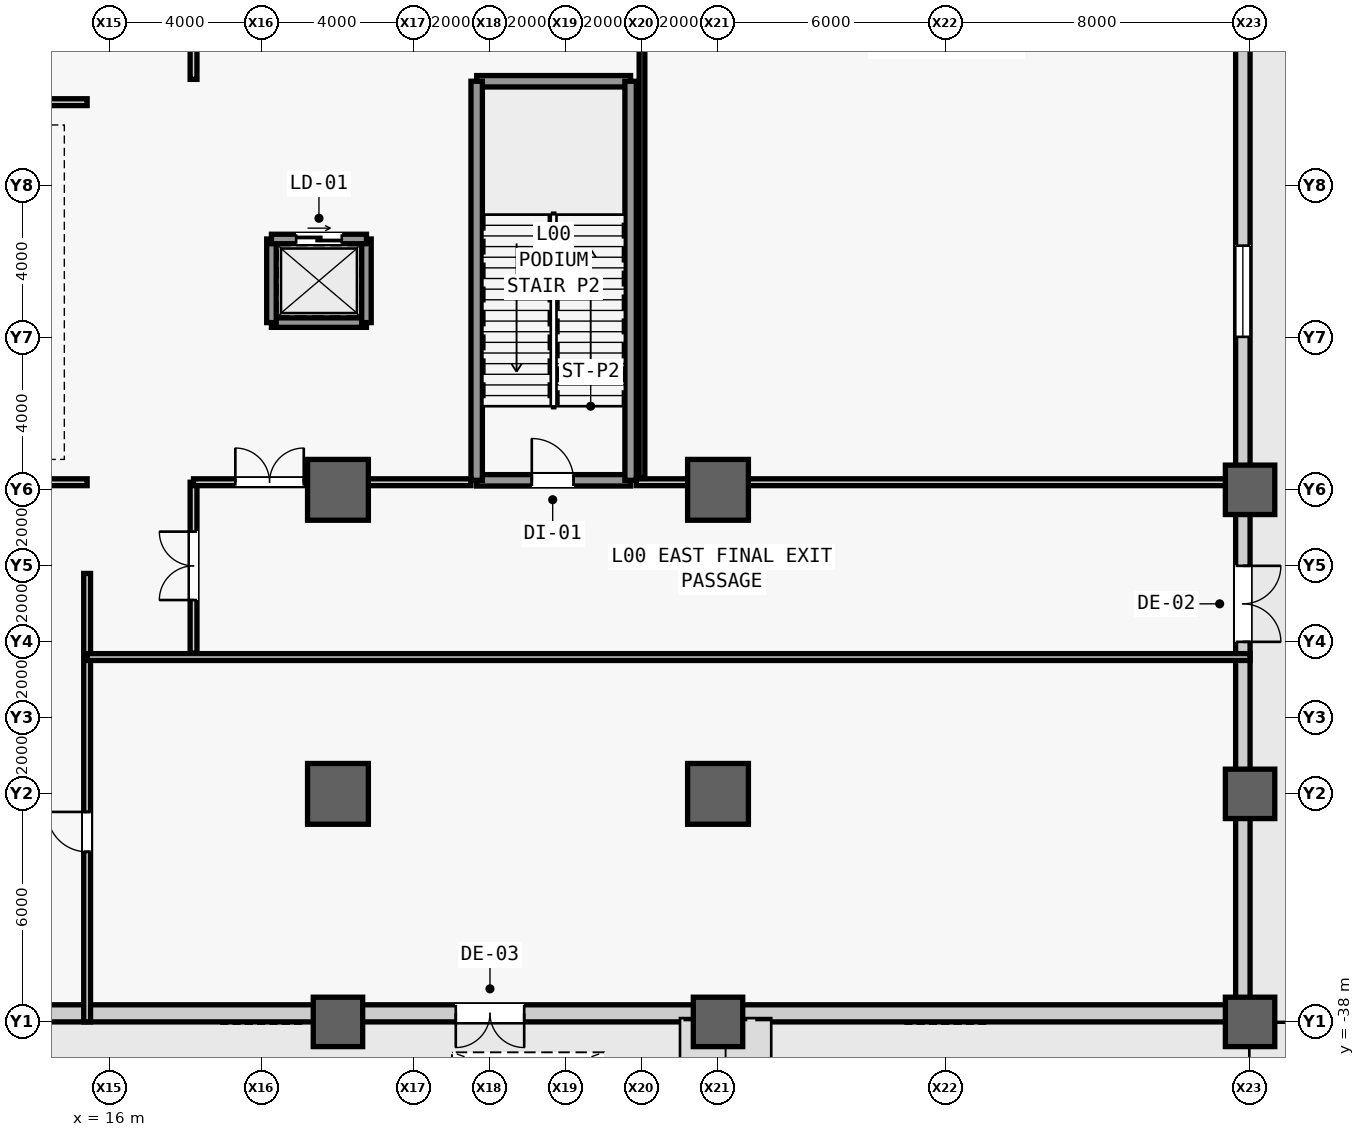
"""IFC4 building model, lengths in metres.
Left out: names, types, materials, properties, quantities, classifications, styles, units other than length and angle.
Written with IfcOpenShell. Run it as: python <this file> out.ifc"""

import sys

from ifc_helpers import new_model, si_unit, direction, frame, frame_2d, origin, origin_2d, place, context, subcontext, project, spatial, rectangle, extrude, source, transform, mapped, element, fill, save


model = new_model("IFC4")
c1 = context("Model", 3, precision=1e-05, world=origin(), true_north=direction((0.0, 1.0)))
c2 = subcontext(c1, "Body", "Model", "MODEL_VIEW")
j1 = project(units=[si_unit("LENGTHUNIT", "METRE"), si_unit("PLANEANGLEUNIT", "RADIAN")], contexts=[c1])
p1 = place(None, origin())
s1 = spatial("IfcSite", under=j1, at=p1, CompositionType="ELEMENT")
p2 = place(p1, origin())
s2 = spatial("IfcBuilding", under=s1, at=p2, CompositionType="ELEMENT")
p3 = place(p2, origin())
s3 = spatial("IfcBuildingStorey", under=s2, at=p3, CompositionType="ELEMENT", Elevation=0.0)
m1 = source(origin(), c2, "Body", "SweptSolid", [
    extrude(rectangle(XDim=1.3, YDim=1.3, at=origin_2d()), origin(), (0.0, 0.0, 1.0), 6.6),
])
p4 = place(p3, frame((22.0, -38.0, 0.0), z_axis=(0.0, 0.0, 1.0), x_axis=(1.0, 0.0, 0.0)))
e1 = element("IfcColumn", 1, at=p4, inside=s3, PredefinedType="COLUMN", context=c2, shape_type="MappedRepresentation", body=[
    mapped(m1, transform((0.0, 0.0, 0.0), scale=1.0)),
])
m2 = source(origin(), c2, "Body", "SweptSolid", [
    extrude(rectangle(XDim=1.6, YDim=1.6, at=origin_2d()), origin(), (0.0, 0.0, 1.0), 6.6),
])
for number, where, z_axis, x_axis in (
    (2, (22.0, -32.0, 0.0), (0.0, 0.0, 1.0), (1.0, 0.0, 0.0)),
    (3, (22.0, -24.0, 0.0), (0.0, 0.0, 1.0), (1.0, 0.0, 0.0)),
):
    element("IfcColumn", number, at=place(p3, frame(where, z_axis=z_axis, x_axis=x_axis)), inside=s3, PredefinedType="COLUMN", context=c2, shape_type="MappedRepresentation", body=[
        mapped(m2, transform((0.0, 0.0, 0.0), scale=1.0)),
    ])
p5 = place(p3, frame((32.0, -38.0, 0.0), z_axis=(0.0, 0.0, 1.0), x_axis=(1.0, 0.0, 0.0)))
e4 = element("IfcColumn", 4, at=p5, inside=s3, PredefinedType="COLUMN", context=c2, shape_type="MappedRepresentation", body=[
    mapped(m1, transform((0.0, 0.0, 0.0), scale=1.0)),
])
for number, where, z_axis, x_axis in (
    (5, (32.0, -32.0, 0.0), (0.0, 0.0, 1.0), (1.0, 0.0, 0.0)),
    (6, (32.0, -24.0, 0.0), (0.0, 0.0, 1.0), (1.0, 0.0, 0.0)),
):
    element("IfcColumn", number, at=place(p3, frame(where, z_axis=z_axis, x_axis=x_axis)), inside=s3, PredefinedType="COLUMN", context=c2, shape_type="MappedRepresentation", body=[
        mapped(m2, transform((0.0, 0.0, 0.0), scale=1.0)),
    ])
for number, where, z_axis, x_axis in (
    (7, (46.0, -38.0, 0.0), (0.0, 0.0, 1.0), (1.0, 0.0, 0.0)),
    (8, (46.0, -24.0, 0.0), (0.0, 0.0, 1.0), (1.0, 0.0, 0.0)),
    (9, (46.0, -32.0, 0.0), (0.0, 0.0, 1.0), (1.0, 0.0, 0.0)),
):
    element("IfcColumn", number, at=place(p3, frame(where, z_axis=z_axis, x_axis=x_axis)), inside=s3, PredefinedType="COLUMN", context=c2, shape_type="MappedRepresentation", body=[
        mapped(m1, transform((0.0, 0.0, 0.0), scale=1.0)),
    ])
m3 = source(origin(), c2, "Body", "SweptSolid", [
    extrude(rectangle(XDim=92.0, YDim=0.45, at=frame_2d((46.0, 0.0))), origin(), (0.0, 0.0, 1.0), 4.48),
])
p6 = place(p3, frame((46.0, -37.775, 0.0), z_axis=(0.0, 0.0, 1.0), x_axis=(-1.0, 0.0, 0.0)))
e10 = element("IfcWall", 10, at=p6, inside=s3, PredefinedType="STANDARD", context=c2, shape_type="MappedRepresentation", body=[
    mapped(m3, transform((0.0, 0.0, 0.0), scale=1.0)),
])
m4 = source(origin(), c2, "Body", "SweptSolid", [
    extrude(rectangle(XDim=2.4, YDim=2.8, at=frame_2d((1.2, 1.4))), frame((0.0, 0.235, 0.0), z_axis=(0.0, -1.0, 0.0), x_axis=(1.0, 0.0, 0.0)), (0.0, 0.0, 1.0), 0.47),
])
p7 = place(p6, frame((48.8, 0.0, 0.0)))
e11 = element("IfcOpeningElement", 11, at=p7, cuts=e10, PredefinedType="OPENING", context=c2, shape_type="MappedRepresentation", body=[
    mapped(m4, transform((0.0, 0.0, 0.0), scale=1.0)),
])
p8 = place(p6, frame((40.8, 0.0, 0.0)))
e12 = element("IfcOpeningElement", 12, at=p8, cuts=e10, PredefinedType="OPENING", context=c2, shape_type="MappedRepresentation", body=[
    mapped(m4, transform((0.0, 0.0, 0.0), scale=1.0)),
])
m5 = source(origin(), c2, "Body", "SweptSolid", [
    extrude(rectangle(XDim=1.8, YDim=2.4, at=frame_2d((0.9, 1.2))), frame((0.0, 0.235, 0.0), z_axis=(0.0, -1.0, 0.0), x_axis=(1.0, 0.0, 0.0)), (0.0, 0.0, 1.0), 0.47),
])
p9 = place(p6, frame((71.1, 0.0, 0.0)))
e13 = element("IfcOpeningElement", 13, at=p9, cuts=e10, PredefinedType="OPENING", context=c2, shape_type="MappedRepresentation", body=[
    mapped(m5, transform((0.0, 0.0, 0.0), scale=1.0)),
])
p10 = place(p6, frame((19.1, 0.0, 0.0)))
e14 = element("IfcOpeningElement", 14, at=p10, cuts=e10, PredefinedType="OPENING", context=c2, shape_type="MappedRepresentation", body=[
    mapped(m5, transform((0.0, 0.0, 0.0), scale=1.0)),
])
m6 = source(origin(), c2, "Body", "SweptSolid", [
    extrude(rectangle(XDim=75.1, YDim=0.38, at=frame_2d((37.55, 0.0))), origin(), (0.0, 0.0, 1.0), 4.48),
])
p11 = place(p3, frame((45.81, 37.55, 0.0), z_axis=(0.0, 0.0, 1.0), x_axis=(0.0, -1.0, 0.0)))
e15 = element("IfcWall", 15, at=p11, inside=s3, PredefinedType="STANDARD", context=c2, shape_type="MappedRepresentation", body=[
    mapped(m6, transform((0.0, 0.0, 0.0), scale=1.0)),
])
m7 = source(origin(), c2, "Body", "SweptSolid", [
    extrude(rectangle(XDim=2.0, YDim=2.3, at=frame_2d((1.0, 1.15))), frame((0.0, 0.2, 0.0), z_axis=(0.0, -1.0, 0.0), x_axis=(1.0, 0.0, 0.0)), (0.0, 0.0, 1.0), 0.4),
])
p12 = place(p11, frame((63.55, 0.0, 0.0)))
e16 = element("IfcOpeningElement", 16, at=p12, cuts=e15, PredefinedType="OPENING", context=c2, shape_type="MappedRepresentation", body=[
    mapped(m7, transform((0.0, 0.0, 0.0), scale=1.0)),
])
m8 = source(origin(), c2, "Body", "SweptSolid", [
    extrude(rectangle(XDim=6.2, YDim=3.6, at=frame_2d((3.1, 1.8))), frame((0.0, 0.2, 0.0), z_axis=(0.0, -1.0, 0.0), x_axis=(1.0, 0.0, 0.0)), (0.0, 0.0, 1.0), 0.4),
])
p13 = place(p11, frame((0.75, 0.0, 0.0)))
e17 = element("IfcOpeningElement", 17, at=p13, cuts=e15, PredefinedType="OPENING", context=c2, shape_type="MappedRepresentation", body=[
    mapped(m8, transform((0.0, 0.0, 0.0), scale=1.0)),
])
m9 = source(origin(), c2, "Body", "SweptSolid", [
    extrude(rectangle(XDim=2.4, YDim=2.6, at=frame_2d((1.2, 1.3))), frame((0.0, 0.2, 0.0), z_axis=(0.0, -1.0, 0.0), x_axis=(1.0, 0.0, 0.0)), (0.0, 0.0, 1.0), 0.4),
])
p14 = place(p11, frame((17.575, 0.0, 0.7)))
e18 = element("IfcOpeningElement", 18, at=p14, cuts=e15, PredefinedType="OPENING", context=c2, shape_type="MappedRepresentation", body=[
    mapped(m9, transform((0.0, 0.0, 0.0), scale=1.0)),
])
p15 = place(p11, frame((55.125, 0.0, 0.7)))
e19 = element("IfcOpeningElement", 19, at=p15, cuts=e15, PredefinedType="OPENING", context=c2, shape_type="MappedRepresentation", body=[
    mapped(m9, transform((0.0, 0.0, 0.0), scale=1.0)),
])
m10 = source(origin(), c2, "Body", "SweptSolid", [
    extrude(rectangle(XDim=4.05, YDim=0.3, at=frame_2d((2.025, 0.0))), origin(), (0.0, 0.0, 1.0), 6.28),
])
p16 = place(p3, frame((25.65, -23.75, 0.0), z_axis=(0.0, 0.0, 1.0), x_axis=(1.0, 0.0, 0.0)))
e20 = element("IfcWall", 20, at=p16, inside=s3, PredefinedType="SHEAR", context=c2, shape_type="MappedRepresentation", body=[
    mapped(m10, transform((0.0, 0.0, 0.0), scale=1.0)),
])
m11 = source(origin(), c2, "Body", "SweptSolid", [
    extrude(rectangle(XDim=1.1, YDim=2.2, at=frame_2d((0.55, 1.1))), frame((0.0, 0.16, 0.0), z_axis=(0.0, -1.0, 0.0), x_axis=(1.0, 0.0, 0.0)), (0.0, 0.0, 1.0), 0.32),
])
p17 = place(p16, frame((1.45, 0.0, 0.0)))
e21 = element("IfcOpeningElement", 21, at=p17, cuts=e20, PredefinedType="OPENING", context=c2, shape_type="MappedRepresentation", body=[
    mapped(m11, transform((0.0, 0.0, 0.0), scale=1.0)),
])
p18 = place(p3, frame((25.65, -13.25, 0.0), z_axis=(0.0, 0.0, 1.0), x_axis=(1.0, 0.0, 0.0)))
e22 = element("IfcWall", 22, at=p18, inside=s3, PredefinedType="SHEAR", context=c2, shape_type="MappedRepresentation", body=[
    mapped(m10, transform((0.0, 0.0, 0.0), scale=1.0)),
])
m12 = source(origin(), c2, "Body", "SweptSolid", [
    extrude(rectangle(XDim=10.5, YDim=0.3, at=frame_2d((5.25, 0.0))), origin(), (0.0, 0.0, 1.0), 6.28),
])
for number, where, z_axis, x_axis in (
    (23, (25.65, -23.75, 0.0), (0.0, 0.0, 1.0), (0.0, 1.0, 0.0)),
    (24, (29.7, -23.75, 0.0), (0.0, 0.0, 1.0), (0.0, 1.0, 0.0)),
):
    element("IfcWall", number, at=place(p3, frame(where, z_axis=z_axis, x_axis=x_axis)), inside=s3, PredefinedType="SHEAR", context=c2, shape_type="MappedRepresentation", body=[
        mapped(m12, transform((0.0, 0.0, 0.0), scale=1.0)),
    ])
m13 = source(origin(), c2, "Body", "SweptSolid", [
    extrude(rectangle(XDim=2.5, YDim=0.25, at=frame_2d((1.25, 0.0))), origin(), (0.0, 0.0, 1.0), 6.28),
])
p19 = place(p3, frame((20.25, -19.6, 0.0), z_axis=(0.0, 0.0, 1.0), x_axis=(1.0, 0.0, 0.0)))
e25 = element("IfcWall", 25, at=p19, inside=s3, PredefinedType="SHEAR", context=c2, shape_type="MappedRepresentation", body=[
    mapped(m13, transform((0.0, 0.0, 0.0), scale=1.0)),
])
m14 = source(origin(), c2, "Body", "SweptSolid", [
    extrude(rectangle(XDim=2.2, YDim=0.25, at=frame_2d((1.1, 0.0))), origin(), (0.0, 0.0, 1.0), 6.28),
])
for number, where, z_axis, x_axis in (
    (26, (20.25, -19.6, 0.0), (0.0, 0.0, 1.0), (0.0, 1.0, 0.0)),
    (27, (22.75, -19.6, 0.0), (0.0, 0.0, 1.0), (0.0, 1.0, 0.0)),
):
    element("IfcWall", number, at=place(p3, frame(where, z_axis=z_axis, x_axis=x_axis)), inside=s3, PredefinedType="SHEAR", context=c2, shape_type="MappedRepresentation", body=[
        mapped(m14, transform((0.0, 0.0, 0.0), scale=1.0)),
    ])
p20 = place(p3, frame((20.25, -17.4, 0.0), z_axis=(0.0, 0.0, 1.0), x_axis=(1.0, 0.0, 0.0)))
e28 = element("IfcWall", 28, at=p20, inside=s3, PredefinedType="SHEAR", context=c2, shape_type="MappedRepresentation", body=[
    mapped(m13, transform((0.0, 0.0, 0.0), scale=1.0)),
])
m15 = source(origin(), c2, "Body", "SweptSolid", [
    extrude(rectangle(XDim=1.2, YDim=2.3, at=frame_2d((0.6, 1.15))), frame((0.0, 0.135, 0.0), z_axis=(0.0, -1.0, 0.0), x_axis=(1.0, 0.0, 0.0)), (0.0, 0.0, 1.0), 0.27),
])
p21 = place(p20, frame((0.65, 0.0, 0.0)))
e29 = element("IfcOpeningElement", 29, at=p21, cuts=e28, PredefinedType="OPENING", context=c2, shape_type="MappedRepresentation", body=[
    mapped(m15, transform((0.0, 0.0, 0.0), scale=1.0)),
])
m16 = source(origin(), c2, "Body", "SweptSolid", [
    extrude(rectangle(XDim=30.8, YDim=0.18, at=frame_2d((15.4, 0.0))), origin(), (0.0, 0.0, 1.0), 4.08),
])
p22 = place(p3, frame((-15.4, -23.8, 0.0), z_axis=(0.0, 0.0, 1.0), x_axis=(1.0, 0.0, 0.0)))
e30 = element("IfcWall", 30, at=p22, inside=s3, PredefinedType="PARTITIONING", context=c2, shape_type="MappedRepresentation", body=[
    mapped(m16, transform((0.0, 0.0, 0.0), scale=1.0)),
])
m17 = source(origin(), c2, "Body", "SweptSolid", [
    extrude(rectangle(XDim=1.8, YDim=2.25, at=frame_2d((0.9, 1.125))), frame((0.0, 0.1, 0.0), z_axis=(0.0, -1.0, 0.0), x_axis=(1.0, 0.0, 0.0)), (0.0, 0.0, 1.0), 0.2),
])
p23 = place(p22, frame((8.5, 0.0, 0.0)))
e31 = element("IfcOpeningElement", 31, at=p23, cuts=e30, PredefinedType="OPENING", context=c2, shape_type="MappedRepresentation", body=[
    mapped(m17, transform((0.0, 0.0, 0.0), scale=1.0)),
])
p24 = place(p22, frame((20.5, 0.0, 0.0)))
e32 = element("IfcOpeningElement", 32, at=p24, cuts=e30, PredefinedType="OPENING", context=c2, shape_type="MappedRepresentation", body=[
    mapped(m17, transform((0.0, 0.0, 0.0), scale=1.0)),
])
m18 = source(origin(), c2, "Body", "SweptSolid", [
    extrude(rectangle(XDim=1.8, YDim=1.4, at=frame_2d((0.9, 0.7))), frame((0.0, 0.1, 0.0), z_axis=(0.0, -1.0, 0.0), x_axis=(1.0, 0.0, 0.0)), (0.0, 0.0, 1.0), 0.2),
])
p25 = place(p22, frame((3.5, 0.0, 0.9)))
e33 = element("IfcOpeningElement", 33, at=p25, cuts=e30, PredefinedType="OPENING", context=c2, shape_type="MappedRepresentation", body=[
    mapped(m18, transform((0.0, 0.0, 0.0), scale=1.0)),
])
p26 = place(p22, frame((23.7, 0.0, 0.9)))
e34 = element("IfcOpeningElement", 34, at=p26, cuts=e30, PredefinedType="OPENING", context=c2, shape_type="MappedRepresentation", body=[
    mapped(m18, transform((0.0, 0.0, 0.0), scale=1.0)),
])
m19 = source(origin(), c2, "Body", "SweptSolid", [
    extrude(rectangle(XDim=30.8, YDim=0.18, at=frame_2d((15.4, 0.0))), origin(), (0.0, 0.0, 1.0), 6.28),
])
p27 = place(p3, frame((-15.4, -13.8, 0.0), z_axis=(0.0, 0.0, 1.0), x_axis=(1.0, 0.0, 0.0)))
e35 = element("IfcWall", 35, at=p27, inside=s3, PredefinedType="PARTITIONING", context=c2, shape_type="MappedRepresentation", body=[
    mapped(m19, transform((0.0, 0.0, 0.0), scale=1.0)),
])
p28 = place(p27, frame((14.5, 0.0, 0.0)))
e36 = element("IfcOpeningElement", 36, at=p28, cuts=e35, PredefinedType="OPENING", context=c2, shape_type="MappedRepresentation", body=[
    mapped(m17, transform((0.0, 0.0, 0.0), scale=1.0)),
])
m20 = source(origin(), c2, "Body", "SweptSolid", [
    extrude(rectangle(XDim=11.8, YDim=0.18, at=frame_2d((5.9, 0.0))), origin(), (0.0, 0.0, 1.0), 6.28),
])
p29 = place(p3, frame((15.4, -38.0, 0.0), z_axis=(0.0, 0.0, 1.0), x_axis=(0.0, 1.0, 0.0)))
e37 = element("IfcWall", 37, at=p29, inside=s3, PredefinedType="PARTITIONING", context=c2, shape_type="MappedRepresentation", body=[
    mapped(m20, transform((0.0, 0.0, 0.0), scale=1.0)),
])
m21 = source(origin(), c2, "Body", "SweptSolid", [
    extrude(rectangle(XDim=1.05, YDim=2.2, at=frame_2d((0.525, 1.1))), frame((0.0, 0.1, 0.0), z_axis=(0.0, -1.0, 0.0), x_axis=(1.0, 0.0, 0.0)), (0.0, 0.0, 1.0), 0.2),
])
p30 = place(p29, frame((4.475, 0.0, 0.0)))
e38 = element("IfcOpeningElement", 38, at=p30, cuts=e37, PredefinedType="OPENING", context=c2, shape_type="MappedRepresentation", body=[
    mapped(m21, transform((0.0, 0.0, 0.0), scale=1.0)),
])
m22 = source(origin(), c2, "Body", "SweptSolid", [
    extrude(rectangle(XDim=30.6, YDim=0.18, at=frame_2d((15.3, 0.0))), origin(), (0.0, 0.0, 1.0), 4.08),
])
p31 = place(p3, frame((15.4, -28.4, 0.0), z_axis=(0.0, 0.0, 1.0), x_axis=(1.0, 0.0, 0.0)))
e39 = element("IfcWall", 39, at=p31, inside=s3, PredefinedType="PARTITIONING", context=c2, shape_type="MappedRepresentation", body=[
    mapped(m22, transform((0.0, 0.0, 0.0), scale=1.0)),
])
m23 = source(origin(), c2, "Body", "SweptSolid", [
    extrude(rectangle(XDim=4.5, YDim=0.18, at=frame_2d((2.25, 0.0))), origin(), (0.0, 0.0, 1.0), 6.28),
])
p32 = place(p3, frame((18.2, -28.3, 0.0), z_axis=(0.0, 0.0, 1.0), x_axis=(0.0, 1.0, 0.0)))
e40 = element("IfcWall", 40, at=p32, inside=s3, PredefinedType="PARTITIONING", context=c2, shape_type="MappedRepresentation", body=[
    mapped(m23, transform((0.0, 0.0, 0.0), scale=1.0)),
])
p33 = place(p32, frame((1.4, 0.0, 0.0)))
e41 = element("IfcOpeningElement", 41, at=p33, cuts=e40, PredefinedType="OPENING", context=c2, shape_type="MappedRepresentation", body=[
    mapped(m17, transform((0.0, 0.0, 0.0), scale=1.0)),
])
m24 = source(origin(), c2, "Body", "SweptSolid", [
    extrude(rectangle(XDim=7.3, YDim=0.18, at=frame_2d((3.65, 0.0))), origin(), (0.0, 0.0, 1.0), 4.08),
])
p34 = place(p3, frame((18.2, -23.8, 0.0), z_axis=(0.0, 0.0, 1.0), x_axis=(1.0, 0.0, 0.0)))
e42 = element("IfcWall", 42, at=p34, inside=s3, PredefinedType="PARTITIONING", context=c2, shape_type="MappedRepresentation", body=[
    mapped(m24, transform((0.0, 0.0, 0.0), scale=1.0)),
])
p35 = place(p34, frame((1.1, 0.0, 0.0)))
e43 = element("IfcOpeningElement", 43, at=p35, cuts=e42, PredefinedType="OPENING", context=c2, shape_type="MappedRepresentation", body=[
    mapped(m17, transform((0.0, 0.0, 0.0), scale=1.0)),
])
m25 = source(origin(), c2, "Body", "SweptSolid", [
    extrude(rectangle(XDim=16.15, YDim=0.18, at=frame_2d((8.075, 0.0))), origin(), (0.0, 0.0, 1.0), 4.48),
])
p36 = place(p3, frame((29.85, -23.8, 0.0), z_axis=(0.0, 0.0, 1.0), x_axis=(1.0, 0.0, 0.0)))
e44 = element("IfcWall", 44, at=p36, inside=s3, PredefinedType="PARTITIONING", context=c2, shape_type="MappedRepresentation", body=[
    mapped(m25, transform((0.0, 0.0, 0.0), scale=1.0)),
])
m26 = source(origin(), c2, "Body", "SweptSolid", [
    extrude(rectangle(XDim=23.7, YDim=0.15, at=frame_2d((11.85, 0.0))), origin(), (0.0, 0.0, 1.0), 6.28),
])
p37 = place(p3, frame((30.0, -23.7, 0.0), z_axis=(0.0, 0.0, 1.0), x_axis=(0.0, 1.0, 0.0)))
e45 = element("IfcWall", 45, at=p37, inside=s3, PredefinedType="PARTITIONING", context=c2, shape_type="MappedRepresentation", body=[
    mapped(m26, transform((0.0, 0.0, 0.0), scale=1.0)),
])
m27 = source(origin(), c2, "Body", "SweptSolid", [
    extrude(rectangle(XDim=27.0, YDim=0.18, at=frame_2d((13.5, 0.0))), origin(), (0.0, 0.0, 1.0), 6.28),
])
p38 = place(p3, frame((18.2, -13.2, 0.0), z_axis=(0.0, 0.0, 1.0), x_axis=(0.0, 1.0, 0.0)))
e46 = element("IfcWall", 46, at=p38, inside=s3, PredefinedType="PARTITIONING", context=c2, shape_type="MappedRepresentation", body=[
    mapped(m27, transform((0.0, 0.0, 0.0), scale=1.0)),
])
p39 = place(p38, frame((18.8, 0.0, 0.0)))
e47 = element("IfcOpeningElement", 47, at=p39, cuts=e46, PredefinedType="OPENING", context=c2, shape_type="MappedRepresentation", body=[
    mapped(m17, transform((0.0, 0.0, 0.0), scale=1.0)),
])
m28 = source(origin(), c2, "Body", "SweptSolid", [
    extrude(rectangle(XDim=1.8, YDim=2.4, at=frame_2d((0.9, 1.2))), frame((0.0, 0.025, 0.0), z_axis=(0.0, -1.0, 0.0), x_axis=(1.0, 0.0, 0.0)), (0.0, 0.0, 1.0), 0.05),
])
p40 = place(p10, origin())
e48 = element("IfcDoor", 48, at=p40, inside=s3, OperationType="SINGLE_SWING_RIGHT", PredefinedType="DOOR", context=c2, shape_type="MappedRepresentation", body=[
    mapped(m28, transform((0.0, 0.0, 0.0), scale=1.0)),
])
fill(e14, e48)
m29 = source(origin(), c2, "Body", "SweptSolid", [
    extrude(rectangle(XDim=2.0, YDim=2.3, at=frame_2d((1.0, 1.15))), frame((0.0, 0.025, 0.0), z_axis=(0.0, -1.0, 0.0), x_axis=(1.0, 0.0, 0.0)), (0.0, 0.0, 1.0), 0.05),
])
p41 = place(p12, origin())
e49 = element("IfcDoor", 49, at=p41, inside=s3, OperationType="SINGLE_SWING_LEFT", PredefinedType="DOOR", context=c2, shape_type="MappedRepresentation", body=[
    mapped(m29, transform((0.0, 0.0, 0.0), scale=1.0)),
])
fill(e16, e49)
m30 = source(origin(), c2, "Body", "SweptSolid", [
    extrude(rectangle(XDim=2.4, YDim=2.6, at=frame_2d((1.2, 1.3))), frame((0.0, 0.03, 0.0), z_axis=(0.0, -1.0, 0.0), x_axis=(1.0, 0.0, 0.0)), (0.0, 0.0, 1.0), 0.06),
])
p42 = place(p15, origin())
e50 = element("IfcWindow", 50, at=p42, inside=s3, PartitioningType="SINGLE_PANEL", PredefinedType="WINDOW", context=c2, shape_type="MappedRepresentation", body=[
    mapped(m30, transform((0.0, 0.0, 0.0), scale=1.0)),
])
fill(e19, e50)
m31 = source(origin(), c2, "Body", "SweptSolid", [
    extrude(rectangle(XDim=1.1, YDim=2.2, at=frame_2d((0.55, 1.1))), frame((0.0, 0.025, 0.0), z_axis=(0.0, -1.0, 0.0), x_axis=(1.0, 0.0, 0.0)), (0.0, 0.0, 1.0), 0.05),
])
p43 = place(p17, origin())
e51 = element("IfcDoor", 51, at=p43, inside=s3, OperationType="SINGLE_SWING_LEFT", PredefinedType="DOOR", context=c2, shape_type="MappedRepresentation", body=[
    mapped(m31, transform((0.0, 0.0, 0.0), scale=1.0)),
])
fill(e21, e51)
m32 = source(origin(), c2, "Body", "SweptSolid", [
    extrude(rectangle(XDim=1.05, YDim=2.2, at=frame_2d((0.525, 1.1))), frame((0.0, 0.025, 0.0), z_axis=(0.0, -1.0, 0.0), x_axis=(1.0, 0.0, 0.0)), (0.0, 0.0, 1.0), 0.05),
])
p44 = place(p30, origin())
e52 = element("IfcDoor", 52, at=p44, inside=s3, OperationType="SINGLE_SWING_RIGHT", PredefinedType="DOOR", context=c2, shape_type="MappedRepresentation", body=[
    mapped(m32, transform((0.0, 0.0, 0.0), scale=1.0)),
])
fill(e38, e52)
m33 = source(origin(), c2, "Body", "SweptSolid", [
    extrude(rectangle(XDim=1.8, YDim=2.25, at=frame_2d((0.9, 1.125))), frame((0.0, 0.025, 0.0), z_axis=(0.0, -1.0, 0.0), x_axis=(1.0, 0.0, 0.0)), (0.0, 0.0, 1.0), 0.05),
])
p45 = place(p33, origin())
e53 = element("IfcDoor", 53, at=p45, inside=s3, OperationType="SINGLE_SWING_RIGHT", PredefinedType="DOOR", context=c2, shape_type="MappedRepresentation", body=[
    mapped(m33, transform((0.0, 0.0, 0.0), scale=1.0)),
])
fill(e41, e53)
p46 = place(p35, origin())
e54 = element("IfcDoor", 54, at=p46, inside=s3, OperationType="SINGLE_SWING_RIGHT", PredefinedType="DOOR", context=c2, shape_type="MappedRepresentation", body=[
    mapped(m33, transform((0.0, 0.0, 0.0), scale=1.0)),
])
fill(e43, e54)
m34 = source(origin(), c2, "Body", "SweptSolid", [
    extrude(rectangle(XDim=1.2, YDim=2.3, at=frame_2d((0.6, 1.15))), frame((0.0, 0.025, 0.0), z_axis=(0.0, -1.0, 0.0), x_axis=(1.0, 0.0, 0.0)), (0.0, 0.0, 1.0), 0.05),
])
p47 = place(p21, origin())
e55 = element("IfcDoor", 55, at=p47, inside=s3, OperationType="SLIDING_TO_LEFT", PredefinedType="DOOR", context=c2, shape_type="MappedRepresentation", body=[
    mapped(m34, transform((0.0, 0.0, 0.0), scale=1.0)),
])
fill(e29, e55)
save(model, sys.argv[1])
